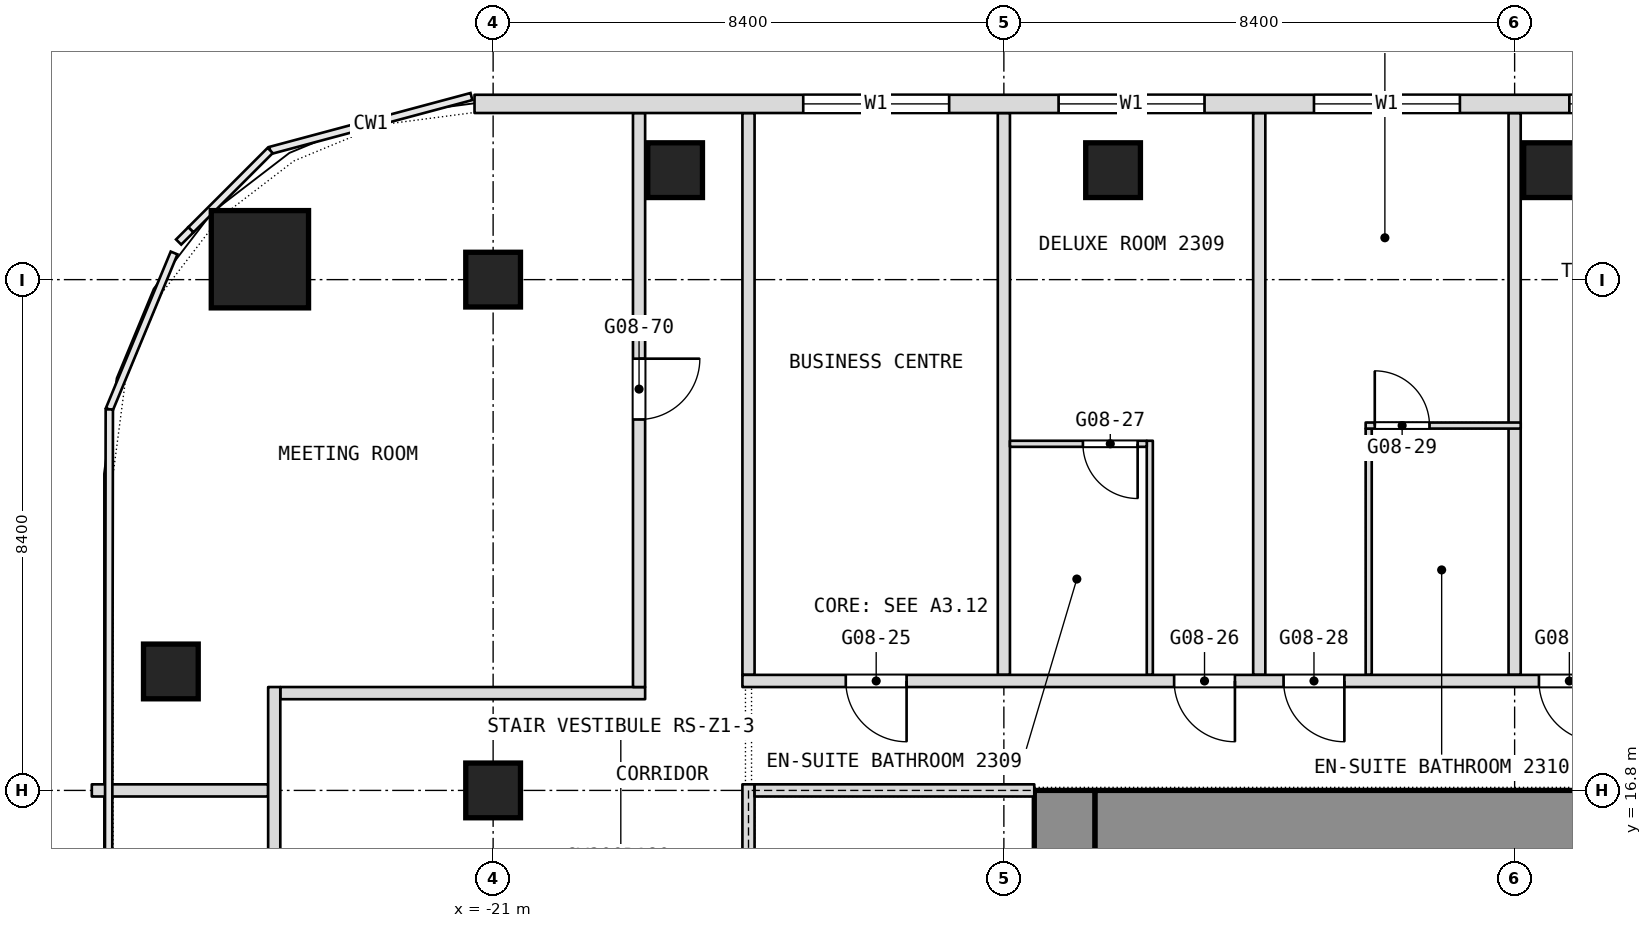
"""IFC4 building model, lengths in metres.
Left out: names, types, materials, properties, quantities, classifications, styles, units other than length and angle.
Written with IfcOpenShell. Run it as: python <this file> out.ifc"""

import sys

from ifc_helpers import new_model, si_unit, direction, frame, frame_2d, origin, origin_2d, place, context, subcontext, project, spatial, rectangle, extrude, element, fill, save


model = new_model("IFC4")
c1 = context("Model", 3, precision=1e-05, world=origin(), true_north=direction((0.0, 1.0)))
c2 = subcontext(c1, "Body", "Model", "MODEL_VIEW")
j1 = project(units=[si_unit("LENGTHUNIT", "METRE"), si_unit("PLANEANGLEUNIT", "RADIAN")], contexts=[c1])
p1 = place(None, origin())
s1 = spatial("IfcSite", under=j1, at=p1, CompositionType="ELEMENT")
p2 = place(p1, origin())
s2 = spatial("IfcBuilding", under=s1, at=p2, CompositionType="ELEMENT")
p3 = place(p2, frame((0.0, 0.0, 108.5)))
s3 = spatial("IfcBuildingStorey", under=s2, at=p3, CompositionType="ELEMENT", Elevation=108.5)
p4 = place(p3, frame((-11.6, 0.0, 0.0), z_axis=(0.0, 0.0, 1.0), x_axis=(0.0, 1.0, 0.0)))
e1 = element("IfcWall", 1, at=p4, inside=s3, PredefinedType="SHEAR", context=c2, shape_type="SweptSolid", body=[
    extrude(rectangle(XDim=16.8, YDim=1.0, at=frame_2d((8.4, 0.0))), origin(), (0.0, 0.0, 1.0), 3.6),
])
p5 = place(p4, frame((3.6, 0.0, 0.0)))
e2 = element("IfcOpeningElement", 2, at=p5, cuts=e1, PredefinedType="OPENING", context=c2, shape_type="SweptSolid", body=[
    extrude(rectangle(XDim=0.9, YDim=2.1, at=frame_2d((0.45, 1.05))), frame((0.0, 0.5, 0.0), z_axis=(0.0, -1.0, 0.0), x_axis=(1.0, 0.0, 0.0)), (0.0, 0.0, 1.0), 1.0),
])
p6 = place(p4, frame((6.825, 0.0, 0.0)))
e3 = element("IfcOpeningElement", 3, at=p6, cuts=e1, PredefinedType="OPENING", context=c2, shape_type="SweptSolid", body=[
    extrude(rectangle(XDim=1.2, YDim=2.1, at=frame_2d((0.6, 1.05))), frame((0.0, 0.5, 0.0), z_axis=(0.0, -1.0, 0.0), x_axis=(1.0, 0.0, 0.0)), (0.0, 0.0, 1.0), 1.0),
])
p7 = place(p4, frame((14.062, 0.0, 0.0)))
e4 = element("IfcOpeningElement", 4, at=p7, cuts=e1, PredefinedType="OPENING", context=c2, shape_type="SweptSolid", body=[
    extrude(rectangle(XDim=0.9, YDim=2.1, at=frame_2d((0.45, 1.05))), frame((0.0, 0.5, 0.0), z_axis=(0.0, -1.0, 0.0), x_axis=(1.0, 0.0, 0.0)), (0.0, 0.0, 1.0), 1.0),
])
p8 = place(p4, frame((11.438, 0.0, 0.0)))
e5 = element("IfcOpeningElement", 5, at=p8, cuts=e1, PredefinedType="OPENING", context=c2, shape_type="SweptSolid", body=[
    extrude(rectangle(XDim=0.9, YDim=2.1, at=frame_2d((0.45, 1.05))), frame((0.0, 0.5, 0.0), z_axis=(0.0, -1.0, 0.0), x_axis=(1.0, 0.0, 0.0)), (0.0, 0.0, 1.0), 1.0),
])
p9 = place(p4, frame((8.775, 0.0, 0.0)))
e6 = element("IfcOpeningElement", 6, at=p9, cuts=e1, PredefinedType="OPENING", context=c2, shape_type="SweptSolid", body=[
    extrude(rectangle(XDim=1.2, YDim=2.1, at=frame_2d((0.6, 1.05))), frame((0.0, 0.5, 0.0), z_axis=(0.0, -1.0, 0.0), x_axis=(1.0, 0.0, 0.0)), (0.0, 0.0, 1.0), 1.0),
])
p10 = place(p3, frame((-11.1, 16.3, 0.0), z_axis=(0.0, 0.0, 1.0), x_axis=(1.0, 0.0, 0.0)))
e7 = element("IfcWall", 7, at=p10, inside=s3, PredefinedType="SHEAR", context=c2, shape_type="SweptSolid", body=[
    extrude(rectangle(XDim=22.2, YDim=1.0, at=frame_2d((11.1, 0.0))), origin(), (0.0, 0.0, 1.0), 3.6),
])
p11 = place(p3, frame((-24.835, 25.535, 0.0), z_axis=(0.0, 0.0, 1.0), x_axis=(1.0, 0.0, 0.0)))
e8 = element("IfcColumn", 8, at=p11, inside=s3, PredefinedType="COLUMN", context=c2, shape_type="SweptSolid", body=[
    extrude(rectangle(XDim=1.6, YDim=1.6, at=origin_2d()), origin(), (0.0, 0.0, 1.0), 3.6),
])
for number, where, z_axis, x_axis in (
    (9, (-21.0, 16.8, 0.0), (0.0, 0.0, 1.0), (1.0, 0.0, 0.0)),
    (10, (-21.0, 25.2, 0.0), (0.0, 0.0, 1.0), (1.0, 0.0, 0.0)),
    (11, (-26.3, 18.756, 0.0), (0.0, 0.0, 1.0), (1.0, 0.0, 0.0)),
    (12, (-18.007, 27.0, 0.0), (0.0, 0.0, 1.0), (1.0, 0.0, 0.0)),
    (13, (-10.804, 27.0, 0.0), (0.0, 0.0, 1.0), (1.0, 0.0, 0.0)),
    (14, (-3.601, 27.0, 0.0), (0.0, 0.0, 1.0), (1.0, 0.0, 0.0)),
):
    element("IfcColumn", number, at=place(p3, frame(where, z_axis=z_axis, x_axis=x_axis)), inside=s3, PredefinedType="COLUMN", context=c2, shape_type="SweptSolid", body=[
        extrude(rectangle(XDim=0.9, YDim=0.9, at=origin_2d()), origin(), (0.0, 0.0, 1.0), 3.6),
    ])
p12 = place(p3, frame((-4.2, 18.7, 0.0), z_axis=(0.0, 0.0, 1.0), x_axis=(0.0, 1.0, 0.0)))
e15 = element("IfcWall", 15, at=p12, inside=s3, PredefinedType="PARTITIONING", context=c2, shape_type="SweptSolid", body=[
    extrude(rectangle(XDim=9.24, YDim=0.2, at=frame_2d((4.62, 0.0))), origin(), (0.0, 0.0, 1.0), 3.34),
])
p13 = place(p3, frame((-6.6, 18.7, 0.0), z_axis=(0.0, 0.0, 1.0), x_axis=(0.0, 1.0, 0.0)))
e16 = element("IfcWall", 16, at=p13, inside=s3, PredefinedType="PARTITIONING", context=c2, shape_type="SweptSolid", body=[
    extrude(rectangle(XDim=4.05, YDim=0.1, at=frame_2d((2.025, 0.0))), origin(), (0.0, 0.0, 1.0), 3.34),
])
p14 = place(p3, frame((-8.4, 18.7, 0.0), z_axis=(0.0, 0.0, 1.0), x_axis=(0.0, 1.0, 0.0)))
e17 = element("IfcWall", 17, at=p14, inside=s3, PredefinedType="PARTITIONING", context=c2, shape_type="SweptSolid", body=[
    extrude(rectangle(XDim=9.24, YDim=0.2, at=frame_2d((4.62, 0.0))), origin(), (0.0, 0.0, 1.0), 3.34),
])
p15 = place(p3, frame((-10.2, 18.7, 0.0), z_axis=(0.0, 0.0, 1.0), x_axis=(0.0, 1.0, 0.0)))
e18 = element("IfcWall", 18, at=p15, inside=s3, PredefinedType="PARTITIONING", context=c2, shape_type="SweptSolid", body=[
    extrude(rectangle(XDim=3.85, YDim=0.1, at=frame_2d((1.925, 0.0))), origin(), (0.0, 0.0, 1.0), 3.34),
])
for number, where, z_axis, x_axis in (
    (19, (-12.6, 18.7, 0.0), (0.0, 0.0, 1.0), (0.0, 1.0, 0.0)),
    (20, (-16.8, 18.7, 0.0), (0.0, 0.0, 1.0), (0.0, 1.0, 0.0)),
):
    element("IfcWall", number, at=place(p3, frame(where, z_axis=z_axis, x_axis=x_axis)), inside=s3, PredefinedType="PARTITIONING", context=c2, shape_type="SweptSolid", body=[
        extrude(rectangle(XDim=9.24, YDim=0.2, at=frame_2d((4.62, 0.0))), origin(), (0.0, 0.0, 1.0), 3.34),
    ])
p16 = place(p3, frame((-27.6, 16.8, 0.0), z_axis=(0.0, 0.0, 1.0), x_axis=(1.0, 0.0, 0.0)))
e21 = element("IfcWall", 21, at=p16, inside=s3, PredefinedType="PARTITIONING", context=c2, shape_type="SweptSolid", body=[
    extrude(rectangle(XDim=2.9, YDim=0.2, at=frame_2d((1.45, 0.0))), origin(), (0.0, 0.0, 1.0), 2.89),
])
p17 = place(p3, frame((-24.5, 18.4, 0.0), z_axis=(0.0, 0.0, 1.0), x_axis=(1.0, 0.0, 0.0)))
e22 = element("IfcWall", 22, at=p17, inside=s3, PredefinedType="PARTITIONING", context=c2, shape_type="SweptSolid", body=[
    extrude(rectangle(XDim=6.0, YDim=0.2, at=frame_2d((3.0, 0.0))), origin(), (0.0, 0.0, 1.0), 3.34),
])
p18 = place(p3, frame((-18.6, 18.5, 0.0), z_axis=(0.0, 0.0, 1.0), x_axis=(0.0, 1.0, 0.0)))
e23 = element("IfcWall", 23, at=p18, inside=s3, PredefinedType="PARTITIONING", context=c2, shape_type="SweptSolid", body=[
    extrude(rectangle(XDim=9.44, YDim=0.2, at=frame_2d((4.72, 0.0))), origin(), (0.0, 0.0, 1.0), 3.34),
])
p19 = place(p18, frame((4.4, 0.0, 0.0)))
e24 = element("IfcOpeningElement", 24, at=p19, cuts=e23, PredefinedType="OPENING", context=c2, shape_type="SweptSolid", body=[
    extrude(rectangle(XDim=1.0, YDim=2.1, at=frame_2d((0.5, 1.05))), frame((0.0, 0.1, 0.0), z_axis=(0.0, -1.0, 0.0), x_axis=(1.0, 0.0, 0.0)), (0.0, 0.0, 1.0), 0.2),
])
p20 = place(p3, frame((-16.9, 18.6, 0.0), z_axis=(0.0, 0.0, 1.0), x_axis=(1.0, 0.0, 0.0)))
e25 = element("IfcWall", 25, at=p20, inside=s3, PredefinedType="PARTITIONING", context=c2, shape_type="SweptSolid", body=[
    extrude(rectangle(XDim=18.4, YDim=0.2, at=frame_2d((9.2, 0.0))), origin(), (0.0, 0.0, 1.0), 3.34),
])
p21 = place(p20, frame((1.7, 0.0, 0.0)))
e26 = element("IfcOpeningElement", 26, at=p21, cuts=e25, PredefinedType="OPENING", context=c2, shape_type="SweptSolid", body=[
    extrude(rectangle(XDim=1.0, YDim=2.1, at=frame_2d((0.5, 1.05))), frame((0.0, 0.1, 0.0), z_axis=(0.0, -1.0, 0.0), x_axis=(1.0, 0.0, 0.0)), (0.0, 0.0, 1.0), 0.2),
])
p22 = place(p20, frame((7.1, 0.0, 0.0)))
e27 = element("IfcOpeningElement", 27, at=p22, cuts=e25, PredefinedType="OPENING", context=c2, shape_type="SweptSolid", body=[
    extrude(rectangle(XDim=1.0, YDim=2.1, at=frame_2d((0.5, 1.05))), frame((0.0, 0.1, 0.0), z_axis=(0.0, -1.0, 0.0), x_axis=(1.0, 0.0, 0.0)), (0.0, 0.0, 1.0), 0.2),
])
p23 = place(p20, frame((8.9, 0.0, 0.0)))
e28 = element("IfcOpeningElement", 28, at=p23, cuts=e25, PredefinedType="OPENING", context=c2, shape_type="SweptSolid", body=[
    extrude(rectangle(XDim=1.0, YDim=2.1, at=frame_2d((0.5, 1.05))), frame((0.0, 0.1, 0.0), z_axis=(0.0, -1.0, 0.0), x_axis=(1.0, 0.0, 0.0)), (0.0, 0.0, 1.0), 0.2),
])
p24 = place(p20, frame((13.1, 0.0, 0.0)))
e29 = element("IfcOpeningElement", 29, at=p24, cuts=e25, PredefinedType="OPENING", context=c2, shape_type="SweptSolid", body=[
    extrude(rectangle(XDim=1.0, YDim=2.1, at=frame_2d((0.5, 1.05))), frame((0.0, 0.1, 0.0), z_axis=(0.0, -1.0, 0.0), x_axis=(1.0, 0.0, 0.0)), (0.0, 0.0, 1.0), 0.2),
])
p25 = place(p3, frame((-12.5, 22.5, 0.0), z_axis=(0.0, 0.0, 1.0), x_axis=(1.0, 0.0, 0.0)))
e30 = element("IfcWall", 30, at=p25, inside=s3, PredefinedType="PARTITIONING", context=c2, shape_type="SweptSolid", body=[
    extrude(rectangle(XDim=2.25, YDim=0.1, at=frame_2d((1.125, 0.0))), origin(), (0.0, 0.0, 1.0), 3.34),
])
p26 = place(p25, frame((1.2, 0.0, 0.0)))
e31 = element("IfcOpeningElement", 31, at=p26, cuts=e30, PredefinedType="OPENING", context=c2, shape_type="SweptSolid", body=[
    extrude(rectangle(XDim=0.9, YDim=2.1, at=frame_2d((0.45, 1.05))), frame((0.0, 0.05, 0.0), z_axis=(0.0, -1.0, 0.0), x_axis=(1.0, 0.0, 0.0)), (0.0, 0.0, 1.0), 0.1),
])
p27 = place(p3, frame((-6.65, 22.8, 0.0), z_axis=(0.0, 0.0, 1.0), x_axis=(1.0, 0.0, 0.0)))
e32 = element("IfcWall", 32, at=p27, inside=s3, PredefinedType="PARTITIONING", context=c2, shape_type="SweptSolid", body=[
    extrude(rectangle(XDim=2.55, YDim=0.1, at=frame_2d((1.275, 0.0))), origin(), (0.0, 0.0, 1.0), 3.34),
])
p28 = place(p27, frame((0.15, 0.0, 0.0)))
e33 = element("IfcOpeningElement", 33, at=p28, cuts=e32, PredefinedType="OPENING", context=c2, shape_type="SweptSolid", body=[
    extrude(rectangle(XDim=0.9, YDim=2.1, at=frame_2d((0.45, 1.05))), frame((0.0, 0.05, 0.0), z_axis=(0.0, -1.0, 0.0), x_axis=(1.0, 0.0, 0.0)), (0.0, 0.0, 1.0), 0.1),
])
p29 = place(p3, frame((-24.6, 6.9, 0.0), z_axis=(0.0, 0.0, 1.0), x_axis=(0.0, 1.0, 0.0)))
e34 = element("IfcWall", 34, at=p29, inside=s3, PredefinedType="PARTITIONING", context=c2, shape_type="SweptSolid", body=[
    extrude(rectangle(XDim=11.6, YDim=0.2, at=frame_2d((5.8, 0.0))), origin(), (0.0, 0.0, 1.0), 3.34),
])
p30 = place(p29, frame((5.45, 0.0, 0.0)))
e35 = element("IfcOpeningElement", 35, at=p30, cuts=e34, PredefinedType="OPENING", context=c2, shape_type="SweptSolid", body=[
    extrude(rectangle(XDim=1.8, YDim=2.1, at=frame_2d((0.9, 1.05))), frame((0.0, 0.1, 0.0), z_axis=(0.0, -1.0, 0.0), x_axis=(1.0, 0.0, 0.0)), (0.0, 0.0, 1.0), 0.2),
])
p31 = place(p29, frame((0.3, 0.0, 0.0)))
e36 = element("IfcOpeningElement", 36, at=p31, cuts=e34, PredefinedType="OPENING", context=c2, shape_type="SweptSolid", body=[
    extrude(rectangle(XDim=1.0, YDim=2.1, at=frame_2d((0.5, 1.05))), frame((0.0, 0.1, 0.0), z_axis=(0.0, -1.0, 0.0), x_axis=(1.0, 0.0, 0.0)), (0.0, 0.0, 1.0), 0.2),
])
p32 = place(p3, frame((21.306, 28.09, 0.0), z_axis=(0.0, 0.0, 1.0), x_axis=(-1.0, 0.0, 0.0)))
e37 = element("IfcWall", 37, at=p32, inside=s3, PredefinedType="NOTDEFINED", context=c2, shape_type="SweptSolid", body=[
    extrude(rectangle(XDim=42.612, YDim=0.3, at=frame_2d((21.306, 0.0))), origin(), (0.0, 0.0, 1.0), 3.6),
])
p33 = place(p32, frame((5.406, 0.0, 0.9)))
e38 = element("IfcOpeningElement", 38, at=p33, cuts=e37, PredefinedType="OPENING", context=c2, shape_type="SweptSolid", body=[
    extrude(rectangle(XDim=2.4, YDim=2.1, at=frame_2d((1.2, 1.05))), frame((0.0, 0.15, 0.0), z_axis=(0.0, -1.0, 0.0), x_axis=(1.0, 0.0, 0.0)), (0.0, 0.0, 1.0), 0.3),
])
p34 = place(p32, frame((9.606, 0.0, 0.9)))
e39 = element("IfcOpeningElement", 39, at=p34, cuts=e37, PredefinedType="OPENING", context=c2, shape_type="SweptSolid", body=[
    extrude(rectangle(XDim=2.4, YDim=2.1, at=frame_2d((1.2, 1.05))), frame((0.0, 0.15, 0.0), z_axis=(0.0, -1.0, 0.0), x_axis=(1.0, 0.0, 0.0)), (0.0, 0.0, 1.0), 0.3),
])
p35 = place(p32, frame((13.806, 0.0, 0.9)))
e40 = element("IfcOpeningElement", 40, at=p35, cuts=e37, PredefinedType="OPENING", context=c2, shape_type="SweptSolid", body=[
    extrude(rectangle(XDim=2.4, YDim=2.1, at=frame_2d((1.2, 1.05))), frame((0.0, 0.15, 0.0), z_axis=(0.0, -1.0, 0.0), x_axis=(1.0, 0.0, 0.0)), (0.0, 0.0, 1.0), 0.3),
])
p36 = place(p32, frame((18.006, 0.0, 0.9)))
e41 = element("IfcOpeningElement", 41, at=p36, cuts=e37, PredefinedType="OPENING", context=c2, shape_type="SweptSolid", body=[
    extrude(rectangle(XDim=2.4, YDim=2.1, at=frame_2d((1.2, 1.05))), frame((0.0, 0.15, 0.0), z_axis=(0.0, -1.0, 0.0), x_axis=(1.0, 0.0, 0.0)), (0.0, 0.0, 1.0), 0.3),
])
p37 = place(p32, frame((22.206, 0.0, 0.9)))
e42 = element("IfcOpeningElement", 42, at=p37, cuts=e37, PredefinedType="OPENING", context=c2, shape_type="SweptSolid", body=[
    extrude(rectangle(XDim=2.4, YDim=2.1, at=frame_2d((1.2, 1.05))), frame((0.0, 0.15, 0.0), z_axis=(0.0, -1.0, 0.0), x_axis=(1.0, 0.0, 0.0)), (0.0, 0.0, 1.0), 0.3),
])
p38 = place(p32, frame((26.406, 0.0, 0.9)))
e43 = element("IfcOpeningElement", 43, at=p38, cuts=e37, PredefinedType="OPENING", context=c2, shape_type="SweptSolid", body=[
    extrude(rectangle(XDim=2.4, YDim=2.1, at=frame_2d((1.2, 1.05))), frame((0.0, 0.15, 0.0), z_axis=(0.0, -1.0, 0.0), x_axis=(1.0, 0.0, 0.0)), (0.0, 0.0, 1.0), 0.3),
])
p39 = place(p32, frame((30.606, 0.0, 0.9)))
e44 = element("IfcOpeningElement", 44, at=p39, cuts=e37, PredefinedType="OPENING", context=c2, shape_type="SweptSolid", body=[
    extrude(rectangle(XDim=2.4, YDim=2.1, at=frame_2d((1.2, 1.05))), frame((0.0, 0.15, 0.0), z_axis=(0.0, -1.0, 0.0), x_axis=(1.0, 0.0, 0.0)), (0.0, 0.0, 1.0), 0.3),
])
p40 = place(p32, frame((34.806, 0.0, 0.9)))
e45 = element("IfcOpeningElement", 45, at=p40, cuts=e37, PredefinedType="OPENING", context=c2, shape_type="SweptSolid", body=[
    extrude(rectangle(XDim=2.4, YDim=2.1, at=frame_2d((1.2, 1.05))), frame((0.0, 0.15, 0.0), z_axis=(0.0, -1.0, 0.0), x_axis=(1.0, 0.0, 0.0)), (0.0, 0.0, 1.0), 0.3),
])
p41 = place(p3, frame((-16.8, -0.1, 0.0), z_axis=(0.0, 0.0, 1.0), x_axis=(0.0, 1.0, 0.0)))
e46 = element("IfcWall", 46, at=p41, inside=s3, PredefinedType="PARTITIONING", context=c2, shape_type="SweptSolid", body=[
    extrude(rectangle(XDim=17.0, YDim=0.2, at=frame_2d((8.5, 0.0))), origin(), (0.0, 0.0, 1.0), 3.34),
])
p42 = place(p41, frame((2.2, 0.0, 0.0)))
e47 = element("IfcOpeningElement", 47, at=p42, cuts=e46, PredefinedType="OPENING", context=c2, shape_type="SweptSolid", body=[
    extrude(rectangle(XDim=1.8, YDim=2.1, at=frame_2d((0.9, 1.05))), frame((0.0, 0.1, 0.0), z_axis=(0.0, -1.0, 0.0), x_axis=(1.0, 0.0, 0.0)), (0.0, 0.0, 1.0), 0.2),
])
p43 = place(p41, frame((7.2, 0.0, 0.0)))
e48 = element("IfcOpeningElement", 48, at=p43, cuts=e46, PredefinedType="OPENING", context=c2, shape_type="SweptSolid", body=[
    extrude(rectangle(XDim=1.8, YDim=2.1, at=frame_2d((0.9, 1.05))), frame((0.0, 0.1, 0.0), z_axis=(0.0, -1.0, 0.0), x_axis=(1.0, 0.0, 0.0)), (0.0, 0.0, 1.0), 0.2),
])
p44 = place(p3, frame((-16.7, 16.8, 0.0), z_axis=(0.0, 0.0, 1.0), x_axis=(1.0, 0.0, 0.0)))
e49 = element("IfcWall", 49, at=p44, inside=s3, PredefinedType="PARTITIONING", context=c2, shape_type="SweptSolid", body=[
    extrude(rectangle(XDim=4.6, YDim=0.2, at=frame_2d((2.3, 0.0))), origin(), (0.0, 0.0, 1.0), 2.89),
])
p45 = place(p19, origin())
e50 = element("IfcDoor", 50, at=p45, inside=s3, OperationType="SINGLE_SWING_RIGHT", PredefinedType="DOOR", context=c2, shape_type="SweptSolid", body=[
    extrude(rectangle(XDim=1.0, YDim=2.1, at=frame_2d((0.5, 1.05))), frame((0.0, 0.025, 0.0), z_axis=(0.0, -1.0, 0.0), x_axis=(1.0, 0.0, 0.0)), (0.0, 0.0, 1.0), 0.05),
])
fill(e24, e50)
p46 = place(p21, origin())
e51 = element("IfcDoor", 51, at=p46, inside=s3, OperationType="SINGLE_SWING_RIGHT", PredefinedType="DOOR", context=c2, shape_type="SweptSolid", body=[
    extrude(rectangle(XDim=1.0, YDim=2.1, at=frame_2d((0.5, 1.05))), frame((0.0, 0.025, 0.0), z_axis=(0.0, -1.0, 0.0), x_axis=(1.0, 0.0, 0.0)), (0.0, 0.0, 1.0), 0.05),
])
fill(e26, e51)
p47 = place(p22, origin())
e52 = element("IfcDoor", 52, at=p47, inside=s3, OperationType="SINGLE_SWING_LEFT", PredefinedType="DOOR", context=c2, shape_type="SweptSolid", body=[
    extrude(rectangle(XDim=1.0, YDim=2.1, at=frame_2d((0.5, 1.05))), frame((0.0, 0.025, 0.0), z_axis=(0.0, -1.0, 0.0), x_axis=(1.0, 0.0, 0.0)), (0.0, 0.0, 1.0), 0.05),
])
fill(e27, e52)
p48 = place(p23, origin())
e53 = element("IfcDoor", 53, at=p48, inside=s3, OperationType="SINGLE_SWING_LEFT", PredefinedType="DOOR", context=c2, shape_type="SweptSolid", body=[
    extrude(rectangle(XDim=1.0, YDim=2.1, at=frame_2d((0.5, 1.05))), frame((0.0, 0.025, 0.0), z_axis=(0.0, -1.0, 0.0), x_axis=(1.0, 0.0, 0.0)), (0.0, 0.0, 1.0), 0.05),
])
fill(e28, e53)
p49 = place(p24, origin())
e54 = element("IfcDoor", 54, at=p49, inside=s3, OperationType="SINGLE_SWING_LEFT", PredefinedType="DOOR", context=c2, shape_type="SweptSolid", body=[
    extrude(rectangle(XDim=1.0, YDim=2.1, at=frame_2d((0.5, 1.05))), frame((0.0, 0.025, 0.0), z_axis=(0.0, -1.0, 0.0), x_axis=(1.0, 0.0, 0.0)), (0.0, 0.0, 1.0), 0.05),
])
fill(e29, e54)
p50 = place(p26, origin())
e55 = element("IfcDoor", 55, at=p50, inside=s3, OperationType="SINGLE_SWING_LEFT", PredefinedType="DOOR", context=c2, shape_type="SweptSolid", body=[
    extrude(rectangle(XDim=0.9, YDim=2.1, at=frame_2d((0.45, 1.05))), frame((0.0, 0.025, 0.0), z_axis=(0.0, -1.0, 0.0), x_axis=(1.0, 0.0, 0.0)), (0.0, 0.0, 1.0), 0.05),
])
fill(e31, e55)
p51 = place(p28, origin())
e56 = element("IfcDoor", 56, at=p51, inside=s3, OperationType="SINGLE_SWING_RIGHT", PredefinedType="DOOR", context=c2, shape_type="SweptSolid", body=[
    extrude(rectangle(XDim=0.9, YDim=2.1, at=frame_2d((0.45, 1.05))), frame((0.0, 0.025, 0.0), z_axis=(0.0, -1.0, 0.0), x_axis=(1.0, 0.0, 0.0)), (0.0, 0.0, 1.0), 0.05),
])
fill(e33, e56)
p52 = place(p37, origin())
e57 = element("IfcWindow", 57, at=p52, inside=s3, PartitioningType="SINGLE_PANEL", PredefinedType="WINDOW", context=c2, shape_type="SweptSolid", body=[
    extrude(rectangle(XDim=2.4, YDim=2.1, at=frame_2d((1.2, 1.05))), frame((0.0, 0.03, 0.0), z_axis=(0.0, -1.0, 0.0), x_axis=(1.0, 0.0, 0.0)), (0.0, 0.0, 1.0), 0.06),
])
fill(e42, e57)
p53 = place(p38, origin())
e58 = element("IfcWindow", 58, at=p53, inside=s3, PartitioningType="SINGLE_PANEL", PredefinedType="WINDOW", context=c2, shape_type="SweptSolid", body=[
    extrude(rectangle(XDim=2.4, YDim=2.1, at=frame_2d((1.2, 1.05))), frame((0.0, 0.03, 0.0), z_axis=(0.0, -1.0, 0.0), x_axis=(1.0, 0.0, 0.0)), (0.0, 0.0, 1.0), 0.06),
])
fill(e43, e58)
p54 = place(p39, origin())
e59 = element("IfcWindow", 59, at=p54, inside=s3, PartitioningType="SINGLE_PANEL", PredefinedType="WINDOW", context=c2, shape_type="SweptSolid", body=[
    extrude(rectangle(XDim=2.4, YDim=2.1, at=frame_2d((1.2, 1.05))), frame((0.0, 0.03, 0.0), z_axis=(0.0, -1.0, 0.0), x_axis=(1.0, 0.0, 0.0)), (0.0, 0.0, 1.0), 0.06),
])
fill(e44, e59)
p55 = place(p40, origin())
e60 = element("IfcWindow", 60, at=p55, inside=s3, PartitioningType="SINGLE_PANEL", PredefinedType="WINDOW", context=c2, shape_type="SweptSolid", body=[
    extrude(rectangle(XDim=2.4, YDim=2.1, at=frame_2d((1.2, 1.05))), frame((0.0, 0.03, 0.0), z_axis=(0.0, -1.0, 0.0), x_axis=(1.0, 0.0, 0.0)), (0.0, 0.0, 1.0), 0.06),
])
fill(e45, e60)
save(model, sys.argv[1])
